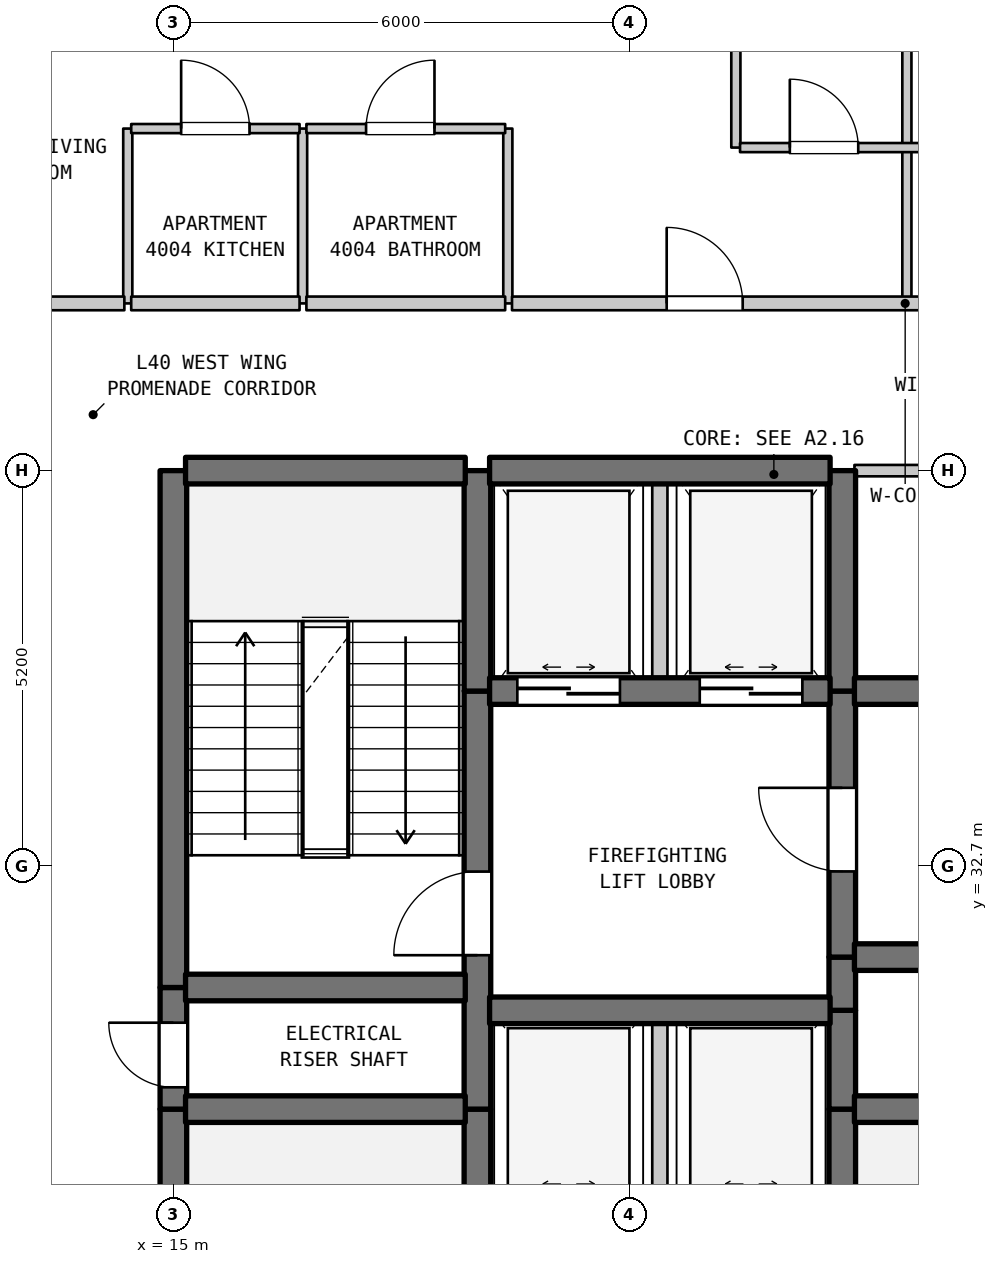
"""IFC4 building model, lengths in metres.
Left out: names, types, materials, properties, quantities, classifications, styles, units other than length and angle.
Written with IfcOpenShell. Run it as: python <this file> out.ifc"""

import sys

from ifc_helpers import new_model, si_unit, direction, frame, frame_2d, origin, place, context, subcontext, project, spatial, rectangle, extrude, element, fill, save


model = new_model("IFC4")
c1 = context("Model", 3, precision=1e-05, world=origin(), true_north=direction((0.0, 1.0)))
c2 = subcontext(c1, "Body", "Model", "MODEL_VIEW")
j1 = project(units=[si_unit("LENGTHUNIT", "METRE"), si_unit("PLANEANGLEUNIT", "RADIAN")], contexts=[c1])
p1 = place(None, origin())
s1 = spatial("IfcSite", under=j1, at=p1, CompositionType="ELEMENT")
p2 = place(p1, origin())
s2 = spatial("IfcBuilding", under=s1, at=p2, CompositionType="ELEMENT")
p3 = place(p2, frame((0.0, 0.0, 164.6)))
s3 = spatial("IfcBuildingStorey", under=s2, at=p3, CompositionType="ELEMENT", Elevation=164.6)
p4 = place(p3, frame((14.4, 40.1, 0.0), z_axis=(0.0, 0.0, 1.0), x_axis=(0.0, 1.0, 0.0)))
e1 = element("IfcWall", 1, at=p4, inside=s3, PredefinedType="PARTITIONING", context=c2, shape_type="SweptSolid", body=[
    extrude(rectangle(XDim=2.3, YDim=0.12, at=frame_2d((1.15, 0.0))), origin(), (0.0, 0.0, 1.0), 4.19),
])
p5 = place(p3, frame((15.0, 22.7, 0.0), z_axis=(0.0, 0.0, 1.0), x_axis=(0.0, 1.0, 0.0)))
e2 = element("IfcWall", 2, at=p5, inside=s3, PredefinedType="SHEAR", context=c2, shape_type="SweptSolid", body=[
    extrude(rectangle(XDim=6.8, YDim=0.35, at=frame_2d((3.4, 0.0))), origin(), (0.0, 0.0, 1.0), 4.19),
])
p6 = place(p3, frame((15.0, 29.5, 0.0), z_axis=(0.0, 0.0, 1.0), x_axis=(0.0, 1.0, 0.0)))
e3 = element("IfcWall", 3, at=p6, inside=s3, PredefinedType="SHEAR", context=c2, shape_type="SweptSolid", body=[
    extrude(rectangle(XDim=1.6, YDim=0.35, at=frame_2d((0.8, 0.0))), origin(), (0.0, 0.0, 1.0), 4.19),
])
p7 = place(p6, frame((0.287, 0.0, 0.0)))
e4 = element("IfcOpeningElement", 4, at=p7, cuts=e3, PredefinedType="OPENING", context=c2, shape_type="SweptSolid", body=[
    extrude(rectangle(XDim=0.85, YDim=2.1, at=frame_2d((0.425, 1.05))), frame((0.0, 0.185, 0.0), z_axis=(0.0, -1.0, 0.0), x_axis=(1.0, 0.0, 0.0)), (0.0, 0.0, 1.0), 0.37),
])
p8 = place(p3, frame((15.0, 31.1, 0.0), z_axis=(0.0, 0.0, 1.0), x_axis=(0.0, 1.0, 0.0)))
e5 = element("IfcWall", 5, at=p8, inside=s3, PredefinedType="SHEAR", context=c2, shape_type="SweptSolid", body=[
    extrude(rectangle(XDim=6.8, YDim=0.35, at=frame_2d((3.4, 0.0))), origin(), (0.0, 0.0, 1.0), 4.19),
])
p9 = place(p3, frame((16.7, 40.1, 0.0), z_axis=(0.0, 0.0, 1.0), x_axis=(0.0, 1.0, 0.0)))
e6 = element("IfcWall", 6, at=p9, inside=s3, PredefinedType="PARTITIONING", context=c2, shape_type="SweptSolid", body=[
    extrude(rectangle(XDim=2.3, YDim=0.12, at=frame_2d((1.15, 0.0))), origin(), (0.0, 0.0, 1.0), 4.19),
])
p10 = place(p3, frame((19.0, 28.2, 0.0), z_axis=(0.0, 0.0, 1.0), x_axis=(0.0, 1.0, 0.0)))
e7 = element("IfcWall", 7, at=p10, inside=s3, PredefinedType="SHEAR", context=c2, shape_type="SweptSolid", body=[
    extrude(rectangle(XDim=1.3, YDim=0.35, at=frame_2d((0.65, 0.0))), origin(), (0.0, 0.0, 1.0), 4.19),
])
p11 = place(p3, frame((19.0, 29.5, 0.0), z_axis=(0.0, 0.0, 1.0), x_axis=(0.0, 1.0, 0.0)))
e8 = element("IfcWall", 8, at=p11, inside=s3, PredefinedType="SHEAR", context=c2, shape_type="SweptSolid", body=[
    extrude(rectangle(XDim=5.5, YDim=0.35, at=frame_2d((2.75, 0.0))), origin(), (0.0, 0.0, 1.0), 4.19),
])
p12 = place(p11, frame((2.025, 0.0, 0.0)))
e9 = element("IfcOpeningElement", 9, at=p12, cuts=e8, PredefinedType="OPENING", context=c2, shape_type="SweptSolid", body=[
    extrude(rectangle(XDim=1.1, YDim=2.15, at=frame_2d((0.55, 1.075))), frame((0.0, 0.185, 0.0), z_axis=(0.0, -1.0, 0.0), x_axis=(1.0, 0.0, 0.0)), (0.0, 0.0, 1.0), 0.37),
])
p13 = place(p3, frame((19.0, 35.0, 0.0), z_axis=(0.0, 0.0, 1.0), x_axis=(0.0, 1.0, 0.0)))
e10 = element("IfcWall", 10, at=p13, inside=s3, PredefinedType="SHEAR", context=c2, shape_type="SweptSolid", body=[
    extrude(rectangle(XDim=2.9, YDim=0.35, at=frame_2d((1.45, 0.0))), origin(), (0.0, 0.0, 1.0), 4.19),
])
p14 = place(p3, frame((19.4, 40.1, 0.0), z_axis=(0.0, 0.0, 1.0), x_axis=(0.0, 1.0, 0.0)))
e11 = element("IfcWall", 11, at=p14, inside=s3, PredefinedType="PARTITIONING", context=c2, shape_type="SweptSolid", body=[
    extrude(rectangle(XDim=2.3, YDim=0.12, at=frame_2d((1.15, 0.0))), origin(), (0.0, 0.0, 1.0), 4.19),
])
p15 = place(p3, frame((21.4, 28.2, 0.0), z_axis=(0.0, 0.0, 1.0), x_axis=(0.0, 1.0, 0.0)))
e12 = element("IfcWall", 12, at=p15, inside=s3, PredefinedType="STANDARD", context=c2, shape_type="SweptSolid", body=[
    extrude(rectangle(XDim=2.6, YDim=0.2, at=frame_2d((1.3, 0.0))), origin(), (0.0, 0.0, 1.0), 4.19),
])
p16 = place(p3, frame((21.4, 35.0, 0.0), z_axis=(0.0, 0.0, 1.0), x_axis=(0.0, 1.0, 0.0)))
e13 = element("IfcWall", 13, at=p16, inside=s3, PredefinedType="STANDARD", context=c2, shape_type="SweptSolid", body=[
    extrude(rectangle(XDim=2.9, YDim=0.2, at=frame_2d((1.45, 0.0))), origin(), (0.0, 0.0, 1.0), 4.19),
])
p17 = place(p3, frame((22.4, 42.15, 0.0), z_axis=(0.0, 0.0, 1.0), x_axis=(0.0, 1.0, 0.0)))
e14 = element("IfcWall", 14, at=p17, inside=s3, PredefinedType="PARTITIONING", context=c2, shape_type="SweptSolid", body=[
    extrude(rectangle(XDim=11.74, YDim=0.12, at=frame_2d((5.87, 0.0))), origin(), (0.0, 0.0, 1.0), 4.19),
])
for number, where, z_axis, x_axis in (
    (15, (23.8, 28.2, 0.0), (0.0, 0.0, 1.0), (0.0, 1.0, 0.0)),
    (16, (23.8, 29.5, 0.0), (0.0, 0.0, 1.0), (0.0, 1.0, 0.0)),
):
    element("IfcWall", number, at=place(p3, frame(where, z_axis=z_axis, x_axis=x_axis)), inside=s3, PredefinedType="SHEAR", context=c2, shape_type="SweptSolid", body=[
        extrude(rectangle(XDim=1.3, YDim=0.35, at=frame_2d((0.65, 0.0))), origin(), (0.0, 0.0, 1.0), 4.19),
    ])
p18 = place(p3, frame((23.8, 30.8, 0.0), z_axis=(0.0, 0.0, 1.0), x_axis=(0.0, 1.0, 0.0)))
e17 = element("IfcWall", 17, at=p18, inside=s3, PredefinedType="SHEAR", context=c2, shape_type="SweptSolid", body=[
    extrude(rectangle(XDim=0.7, YDim=0.35, at=frame_2d((0.35, 0.0))), origin(), (0.0, 0.0, 1.0), 4.19),
])
p19 = place(p3, frame((23.8, 31.5, 0.0), z_axis=(0.0, 0.0, 1.0), x_axis=(0.0, 1.0, 0.0)))
e18 = element("IfcWall", 18, at=p19, inside=s3, PredefinedType="SHEAR", context=c2, shape_type="SweptSolid", body=[
    extrude(rectangle(XDim=3.5, YDim=0.35, at=frame_2d((1.75, 0.0))), origin(), (0.0, 0.0, 1.0), 4.19),
])
p20 = place(p19, frame((1.127, 0.0, 0.0)))
e19 = element("IfcOpeningElement", 19, at=p20, cuts=e18, PredefinedType="OPENING", context=c2, shape_type="SweptSolid", body=[
    extrude(rectangle(XDim=1.1, YDim=2.15, at=frame_2d((0.55, 1.075))), frame((0.0, 0.185, 0.0), z_axis=(0.0, -1.0, 0.0), x_axis=(1.0, 0.0, 0.0)), (0.0, 0.0, 1.0), 0.37),
])
p21 = place(p3, frame((23.8, 35.0, 0.0), z_axis=(0.0, 0.0, 1.0), x_axis=(0.0, 1.0, 0.0)))
e20 = element("IfcWall", 20, at=p21, inside=s3, PredefinedType="SHEAR", context=c2, shape_type="SweptSolid", body=[
    extrude(rectangle(XDim=2.9, YDim=0.35, at=frame_2d((1.45, 0.0))), origin(), (0.0, 0.0, 1.0), 4.19),
])
p22 = place(p3, frame((24.65, 40.1, 0.0), z_axis=(0.0, 0.0, 1.0), x_axis=(0.0, 1.0, 0.0)))
e21 = element("IfcWall", 21, at=p22, inside=s3, PredefinedType="PARTITIONING", context=c2, shape_type="SweptSolid", body=[
    extrude(rectangle(XDim=2.05, YDim=0.12, at=frame_2d((1.025, 0.0))), origin(), (0.0, 0.0, 1.0), 4.19),
])
p23 = place(p3, frame((24.65, 42.15, 0.0), z_axis=(0.0, 0.0, 1.0), x_axis=(0.0, 1.0, 0.0)))
e22 = element("IfcWall", 22, at=p23, inside=s3, PredefinedType="PARTITIONING", context=c2, shape_type="SweptSolid", body=[
    extrude(rectangle(XDim=11.74, YDim=0.12, at=frame_2d((5.87, 0.0))), origin(), (0.0, 0.0, 1.0), 4.19),
])
p24 = place(p3, frame((15.16, 29.5, 0.0), z_axis=(0.0, 0.0, 1.0), x_axis=(1.0, 0.0, 0.0)))
e23 = element("IfcWall", 23, at=p24, inside=s3, PredefinedType="SHEAR", context=c2, shape_type="SweptSolid", body=[
    extrude(rectangle(XDim=3.68, YDim=0.35, at=frame_2d((1.84, 0.0))), origin(), (0.0, 0.0, 1.0), 4.19),
])
p25 = place(p3, frame((23.96, 29.5, 0.0), z_axis=(0.0, 0.0, 1.0), x_axis=(1.0, 0.0, 0.0)))
e24 = element("IfcWall", 24, at=p25, inside=s3, PredefinedType="SHEAR", context=c2, shape_type="SweptSolid", body=[
    extrude(rectangle(XDim=3.18, YDim=0.35, at=frame_2d((1.59, 0.0))), origin(), (0.0, 0.0, 1.0), 4.19),
])
p26 = place(p3, frame((19.16, 30.8, 0.0), z_axis=(0.0, 0.0, 1.0), x_axis=(1.0, 0.0, 0.0)))
e25 = element("IfcWall", 25, at=p26, inside=s3, PredefinedType="SHEAR", context=c2, shape_type="SweptSolid", body=[
    extrude(rectangle(XDim=4.48, YDim=0.35, at=frame_2d((2.24, 0.0))), origin(), (0.0, 0.0, 1.0), 4.19),
])
p27 = place(p3, frame((15.16, 31.1, 0.0), z_axis=(0.0, 0.0, 1.0), x_axis=(1.0, 0.0, 0.0)))
e26 = element("IfcWall", 26, at=p27, inside=s3, PredefinedType="SHEAR", context=c2, shape_type="SweptSolid", body=[
    extrude(rectangle(XDim=3.68, YDim=0.35, at=frame_2d((1.84, 0.0))), origin(), (0.0, 0.0, 1.0), 4.19),
])
p28 = place(p3, frame((23.96, 31.5, 0.0), z_axis=(0.0, 0.0, 1.0), x_axis=(1.0, 0.0, 0.0)))
e27 = element("IfcWall", 27, at=p28, inside=s3, PredefinedType="SHEAR", context=c2, shape_type="SweptSolid", body=[
    extrude(rectangle(XDim=3.18, YDim=0.35, at=frame_2d((1.59, 0.0))), origin(), (0.0, 0.0, 1.0), 4.19),
])
p29 = place(p28, frame((1.094, 0.0, 0.0)))
e28 = element("IfcOpeningElement", 28, at=p29, cuts=e27, PredefinedType="OPENING", context=c2, shape_type="SweptSolid", body=[
    extrude(rectangle(XDim=0.85, YDim=2.1, at=frame_2d((0.425, 1.05))), frame((0.0, 0.185, 0.0), z_axis=(0.0, -1.0, 0.0), x_axis=(1.0, 0.0, 0.0)), (0.0, 0.0, 1.0), 0.37),
])
p30 = place(p3, frame((19.16, 35.0, 0.0), z_axis=(0.0, 0.0, 1.0), x_axis=(1.0, 0.0, 0.0)))
e29 = element("IfcWall", 29, at=p30, inside=s3, PredefinedType="SHEAR", context=c2, shape_type="SweptSolid", body=[
    extrude(rectangle(XDim=4.48, YDim=0.35, at=frame_2d((2.24, 0.0))), origin(), (0.0, 0.0, 1.0), 4.19),
])
p31 = place(p30, frame((0.365, 0.0, 0.0)))
e30 = element("IfcOpeningElement", 30, at=p31, cuts=e29, PredefinedType="OPENING", context=c2, shape_type="SweptSolid", body=[
    extrude(rectangle(XDim=1.35, YDim=2.2, at=frame_2d((0.675, 1.1))), frame((0.0, 0.185, 0.0), z_axis=(0.0, -1.0, 0.0), x_axis=(1.0, 0.0, 0.0)), (0.0, 0.0, 1.0), 0.37),
])
p32 = place(p30, frame((2.765, 0.0, 0.0)))
e31 = element("IfcOpeningElement", 31, at=p32, cuts=e29, PredefinedType="OPENING", context=c2, shape_type="SweptSolid", body=[
    extrude(rectangle(XDim=1.35, YDim=2.2, at=frame_2d((0.675, 1.1))), frame((0.0, 0.185, 0.0), z_axis=(0.0, -1.0, 0.0), x_axis=(1.0, 0.0, 0.0)), (0.0, 0.0, 1.0), 0.37),
])
p33 = place(p3, frame((23.96, 35.0, 0.0), z_axis=(0.0, 0.0, 1.0), x_axis=(1.0, 0.0, 0.0)))
e32 = element("IfcWall", 32, at=p33, inside=s3, PredefinedType="SHEAR", context=c2, shape_type="SweptSolid", body=[
    extrude(rectangle(XDim=3.995, YDim=0.35, at=frame_2d((1.998, 0.0))), origin(), (0.0, 0.0, 1.0), 4.19),
])
p34 = place(p33, frame((1.393, 0.0, 0.0)))
e33 = element("IfcOpeningElement", 33, at=p34, cuts=e32, PredefinedType="OPENING", context=c2, shape_type="SweptSolid", body=[
    extrude(rectangle(XDim=0.95, YDim=2.15, at=frame_2d((0.475, 1.075))), frame((0.0, 0.185, 0.0), z_axis=(0.0, -1.0, 0.0), x_axis=(1.0, 0.0, 0.0)), (0.0, 0.0, 1.0), 0.37),
])
p35 = place(p3, frame((15.16, 37.9, 0.0), z_axis=(0.0, 0.0, 1.0), x_axis=(1.0, 0.0, 0.0)))
e34 = element("IfcWall", 34, at=p35, inside=s3, PredefinedType="SHEAR", context=c2, shape_type="SweptSolid", body=[
    extrude(rectangle(XDim=3.68, YDim=0.35, at=frame_2d((1.84, 0.0))), origin(), (0.0, 0.0, 1.0), 4.19),
])
p36 = place(p3, frame((19.16, 37.9, 0.0), z_axis=(0.0, 0.0, 1.0), x_axis=(1.0, 0.0, 0.0)))
e35 = element("IfcWall", 35, at=p36, inside=s3, PredefinedType="SHEAR", context=c2, shape_type="SweptSolid", body=[
    extrude(rectangle(XDim=4.48, YDim=0.35, at=frame_2d((2.24, 0.0))), origin(), (0.0, 0.0, 1.0), 4.19),
])
p37 = place(p3, frame((23.96, 37.9, 0.0), z_axis=(0.0, 0.0, 1.0), x_axis=(1.0, 0.0, 0.0)))
e36 = element("IfcWall", 36, at=p37, inside=s3, PredefinedType="STANDARD", context=c2, shape_type="SweptSolid", body=[
    extrude(rectangle(XDim=3.995, YDim=0.15, at=frame_2d((1.998, 0.0))), origin(), (0.0, 0.0, 1.0), 3.69),
])
p38 = place(p3, frame((12.875, 40.1, 0.0), z_axis=(0.0, 0.0, 1.0), x_axis=(1.0, 0.0, 0.0)))
e37 = element("IfcWall", 37, at=p38, inside=s3, PredefinedType="STANDARD", context=c2, shape_type="SweptSolid", body=[
    extrude(rectangle(XDim=1.48, YDim=0.18, at=frame_2d((0.74, 0.0))), origin(), (0.0, 0.0, 1.0), 4.19),
])
p39 = place(p3, frame((14.445, 40.1, 0.0), z_axis=(0.0, 0.0, 1.0), x_axis=(1.0, 0.0, 0.0)))
e38 = element("IfcWall", 38, at=p39, inside=s3, PredefinedType="STANDARD", context=c2, shape_type="SweptSolid", body=[
    extrude(rectangle(XDim=2.215, YDim=0.18, at=frame_2d((1.107, 0.0))), origin(), (0.0, 0.0, 1.0), 4.19),
])
p40 = place(p3, frame((16.75, 40.1, 0.0), z_axis=(0.0, 0.0, 1.0), x_axis=(1.0, 0.0, 0.0)))
e39 = element("IfcWall", 39, at=p40, inside=s3, PredefinedType="STANDARD", context=c2, shape_type="SweptSolid", body=[
    extrude(rectangle(XDim=2.615, YDim=0.18, at=frame_2d((1.308, 0.0))), origin(), (0.0, 0.0, 1.0), 4.19),
])
p41 = place(p3, frame((19.455, 40.1, 0.0), z_axis=(0.0, 0.0, 1.0), x_axis=(1.0, 0.0, 0.0)))
e40 = element("IfcWall", 40, at=p41, inside=s3, PredefinedType="STANDARD", context=c2, shape_type="SweptSolid", body=[
    extrude(rectangle(XDim=10.345, YDim=0.18, at=frame_2d((5.172, 0.0))), origin(), (0.0, 0.0, 1.0), 4.19),
])
p42 = place(p41, frame((2.035, 0.0, 0.0)))
e41 = element("IfcOpeningElement", 41, at=p42, cuts=e40, PredefinedType="OPENING", context=c2, shape_type="SweptSolid", body=[
    extrude(rectangle(XDim=1.0, YDim=2.15, at=frame_2d((0.5, 1.075))), frame((0.0, 0.1, 0.0), z_axis=(0.0, -1.0, 0.0), x_axis=(1.0, 0.0, 0.0)), (0.0, 0.0, 1.0), 0.2),
])
p43 = place(p41, frame((7.235, 0.0, 0.0)))
e42 = element("IfcOpeningElement", 42, at=p43, cuts=e40, PredefinedType="OPENING", context=c2, shape_type="SweptSolid", body=[
    extrude(rectangle(XDim=1.0, YDim=2.15, at=frame_2d((0.5, 1.075))), frame((0.0, 0.1, 0.0), z_axis=(0.0, -1.0, 0.0), x_axis=(1.0, 0.0, 0.0)), (0.0, 0.0, 1.0), 0.2),
])
p44 = place(p3, frame((22.455, 42.15, 0.0), z_axis=(0.0, 0.0, 1.0), x_axis=(1.0, 0.0, 0.0)))
e43 = element("IfcWall", 43, at=p44, inside=s3, PredefinedType="PARTITIONING", context=c2, shape_type="SweptSolid", body=[
    extrude(rectangle(XDim=4.41, YDim=0.12, at=frame_2d((2.205, 0.0))), origin(), (0.0, 0.0, 1.0), 4.19),
])
p45 = place(p44, frame((0.655, 0.0, 0.0)))
e44 = element("IfcOpeningElement", 44, at=p45, cuts=e43, PredefinedType="OPENING", context=c2, shape_type="SweptSolid", body=[
    extrude(rectangle(XDim=0.9, YDim=2.15, at=frame_2d((0.45, 1.075))), frame((0.0, 0.07, 0.0), z_axis=(0.0, -1.0, 0.0), x_axis=(1.0, 0.0, 0.0)), (0.0, 0.0, 1.0), 0.14),
])
p46 = place(p44, frame((2.855, 0.0, 0.0)))
e45 = element("IfcOpeningElement", 45, at=p46, cuts=e43, PredefinedType="OPENING", context=c2, shape_type="SweptSolid", body=[
    extrude(rectangle(XDim=0.9, YDim=2.15, at=frame_2d((0.45, 1.075))), frame((0.0, 0.07, 0.0), z_axis=(0.0, -1.0, 0.0), x_axis=(1.0, 0.0, 0.0)), (0.0, 0.0, 1.0), 0.14),
])
p47 = place(p3, frame((14.445, 42.4, 0.0), z_axis=(0.0, 0.0, 1.0), x_axis=(1.0, 0.0, 0.0)))
e46 = element("IfcWall", 46, at=p47, inside=s3, PredefinedType="PARTITIONING", context=c2, shape_type="SweptSolid", body=[
    extrude(rectangle(XDim=2.215, YDim=0.12, at=frame_2d((1.107, 0.0))), origin(), (0.0, 0.0, 1.0), 4.19),
])
p48 = place(p47, frame((0.657, 0.0, 0.0)))
e47 = element("IfcOpeningElement", 47, at=p48, cuts=e46, PredefinedType="OPENING", context=c2, shape_type="SweptSolid", body=[
    extrude(rectangle(XDim=0.9, YDim=2.15, at=frame_2d((0.45, 1.075))), frame((0.0, 0.07, 0.0), z_axis=(0.0, -1.0, 0.0), x_axis=(1.0, 0.0, 0.0)), (0.0, 0.0, 1.0), 0.14),
])
p49 = place(p3, frame((16.75, 42.4, 0.0), z_axis=(0.0, 0.0, 1.0), x_axis=(1.0, 0.0, 0.0)))
e48 = element("IfcWall", 48, at=p49, inside=s3, PredefinedType="PARTITIONING", context=c2, shape_type="SweptSolid", body=[
    extrude(rectangle(XDim=2.615, YDim=0.12, at=frame_2d((1.308, 0.0))), origin(), (0.0, 0.0, 1.0), 4.19),
])
p50 = place(p49, frame((0.785, 0.0, 0.0)))
e49 = element("IfcOpeningElement", 49, at=p50, cuts=e48, PredefinedType="OPENING", context=c2, shape_type="SweptSolid", body=[
    extrude(rectangle(XDim=0.9, YDim=2.1, at=frame_2d((0.45, 1.05))), frame((0.0, 0.07, 0.0), z_axis=(0.0, -1.0, 0.0), x_axis=(1.0, 0.0, 0.0)), (0.0, 0.0, 1.0), 0.14),
])
p51 = place(p7, origin())
e50 = element("IfcDoor", 50, at=p51, inside=s3, OperationType="SINGLE_SWING_RIGHT", PredefinedType="DOOR", context=c2, shape_type="SweptSolid", body=[
    extrude(rectangle(XDim=0.85, YDim=2.1, at=frame_2d((0.425, 1.05))), frame((0.0, 0.025, 0.0), z_axis=(0.0, -1.0, 0.0), x_axis=(1.0, 0.0, 0.0)), (0.0, 0.0, 1.0), 0.05),
])
fill(e4, e50)
p52 = place(p12, origin())
e51 = element("IfcDoor", 51, at=p52, inside=s3, OperationType="SINGLE_SWING_LEFT", PredefinedType="DOOR", context=c2, shape_type="SweptSolid", body=[
    extrude(rectangle(XDim=1.1, YDim=2.15, at=frame_2d((0.55, 1.075))), frame((0.0, 0.025, 0.0), z_axis=(0.0, -1.0, 0.0), x_axis=(1.0, 0.0, 0.0)), (0.0, 0.0, 1.0), 0.05),
])
fill(e9, e51)
p53 = place(p20, origin())
e52 = element("IfcDoor", 52, at=p53, inside=s3, OperationType="SINGLE_SWING_RIGHT", PredefinedType="DOOR", context=c2, shape_type="SweptSolid", body=[
    extrude(rectangle(XDim=1.1, YDim=2.15, at=frame_2d((0.55, 1.075))), frame((0.0, 0.025, 0.0), z_axis=(0.0, -1.0, 0.0), x_axis=(1.0, 0.0, 0.0)), (0.0, 0.0, 1.0), 0.05),
])
fill(e19, e52)
p54 = place(p31, origin())
e53 = element("IfcDoor", 53, at=p54, inside=s3, OperationType="DOUBLE_DOOR_SLIDING", PredefinedType="DOOR", context=c2, shape_type="SweptSolid", body=[
    extrude(rectangle(XDim=1.35, YDim=2.2, at=frame_2d((0.675, 1.1))), frame((0.0, 0.025, 0.0), z_axis=(0.0, -1.0, 0.0), x_axis=(1.0, 0.0, 0.0)), (0.0, 0.0, 1.0), 0.05),
])
fill(e30, e53)
p55 = place(p32, origin())
e54 = element("IfcDoor", 54, at=p55, inside=s3, OperationType="DOUBLE_DOOR_SLIDING", PredefinedType="DOOR", context=c2, shape_type="SweptSolid", body=[
    extrude(rectangle(XDim=1.35, YDim=2.2, at=frame_2d((0.675, 1.1))), frame((0.0, 0.025, 0.0), z_axis=(0.0, -1.0, 0.0), x_axis=(1.0, 0.0, 0.0)), (0.0, 0.0, 1.0), 0.05),
])
fill(e31, e54)
p56 = place(p42, origin())
e55 = element("IfcDoor", 55, at=p56, inside=s3, OperationType="SINGLE_SWING_LEFT", PredefinedType="DOOR", context=c2, shape_type="SweptSolid", body=[
    extrude(rectangle(XDim=1.0, YDim=2.15, at=frame_2d((0.5, 1.075))), frame((0.0, 0.025, 0.0), z_axis=(0.0, -1.0, 0.0), x_axis=(1.0, 0.0, 0.0)), (0.0, 0.0, 1.0), 0.05),
])
fill(e41, e55)
p57 = place(p45, origin())
e56 = element("IfcDoor", 56, at=p57, inside=s3, OperationType="SINGLE_SWING_LEFT", PredefinedType="DOOR", context=c2, shape_type="SweptSolid", body=[
    extrude(rectangle(XDim=0.9, YDim=2.15, at=frame_2d((0.45, 1.075))), frame((0.0, 0.025, 0.0), z_axis=(0.0, -1.0, 0.0), x_axis=(1.0, 0.0, 0.0)), (0.0, 0.0, 1.0), 0.05),
])
fill(e44, e56)
p58 = place(p48, origin())
e57 = element("IfcDoor", 57, at=p58, inside=s3, OperationType="SINGLE_SWING_LEFT", PredefinedType="DOOR", context=c2, shape_type="SweptSolid", body=[
    extrude(rectangle(XDim=0.9, YDim=2.15, at=frame_2d((0.45, 1.075))), frame((0.0, 0.025, 0.0), z_axis=(0.0, -1.0, 0.0), x_axis=(1.0, 0.0, 0.0)), (0.0, 0.0, 1.0), 0.05),
])
fill(e47, e57)
p59 = place(p50, origin())
e58 = element("IfcDoor", 58, at=p59, inside=s3, OperationType="SINGLE_SWING_RIGHT", PredefinedType="DOOR", context=c2, shape_type="SweptSolid", body=[
    extrude(rectangle(XDim=0.9, YDim=2.1, at=frame_2d((0.45, 1.05))), frame((0.0, 0.025, 0.0), z_axis=(0.0, -1.0, 0.0), x_axis=(1.0, 0.0, 0.0)), (0.0, 0.0, 1.0), 0.05),
])
fill(e49, e58)
save(model, sys.argv[1])
